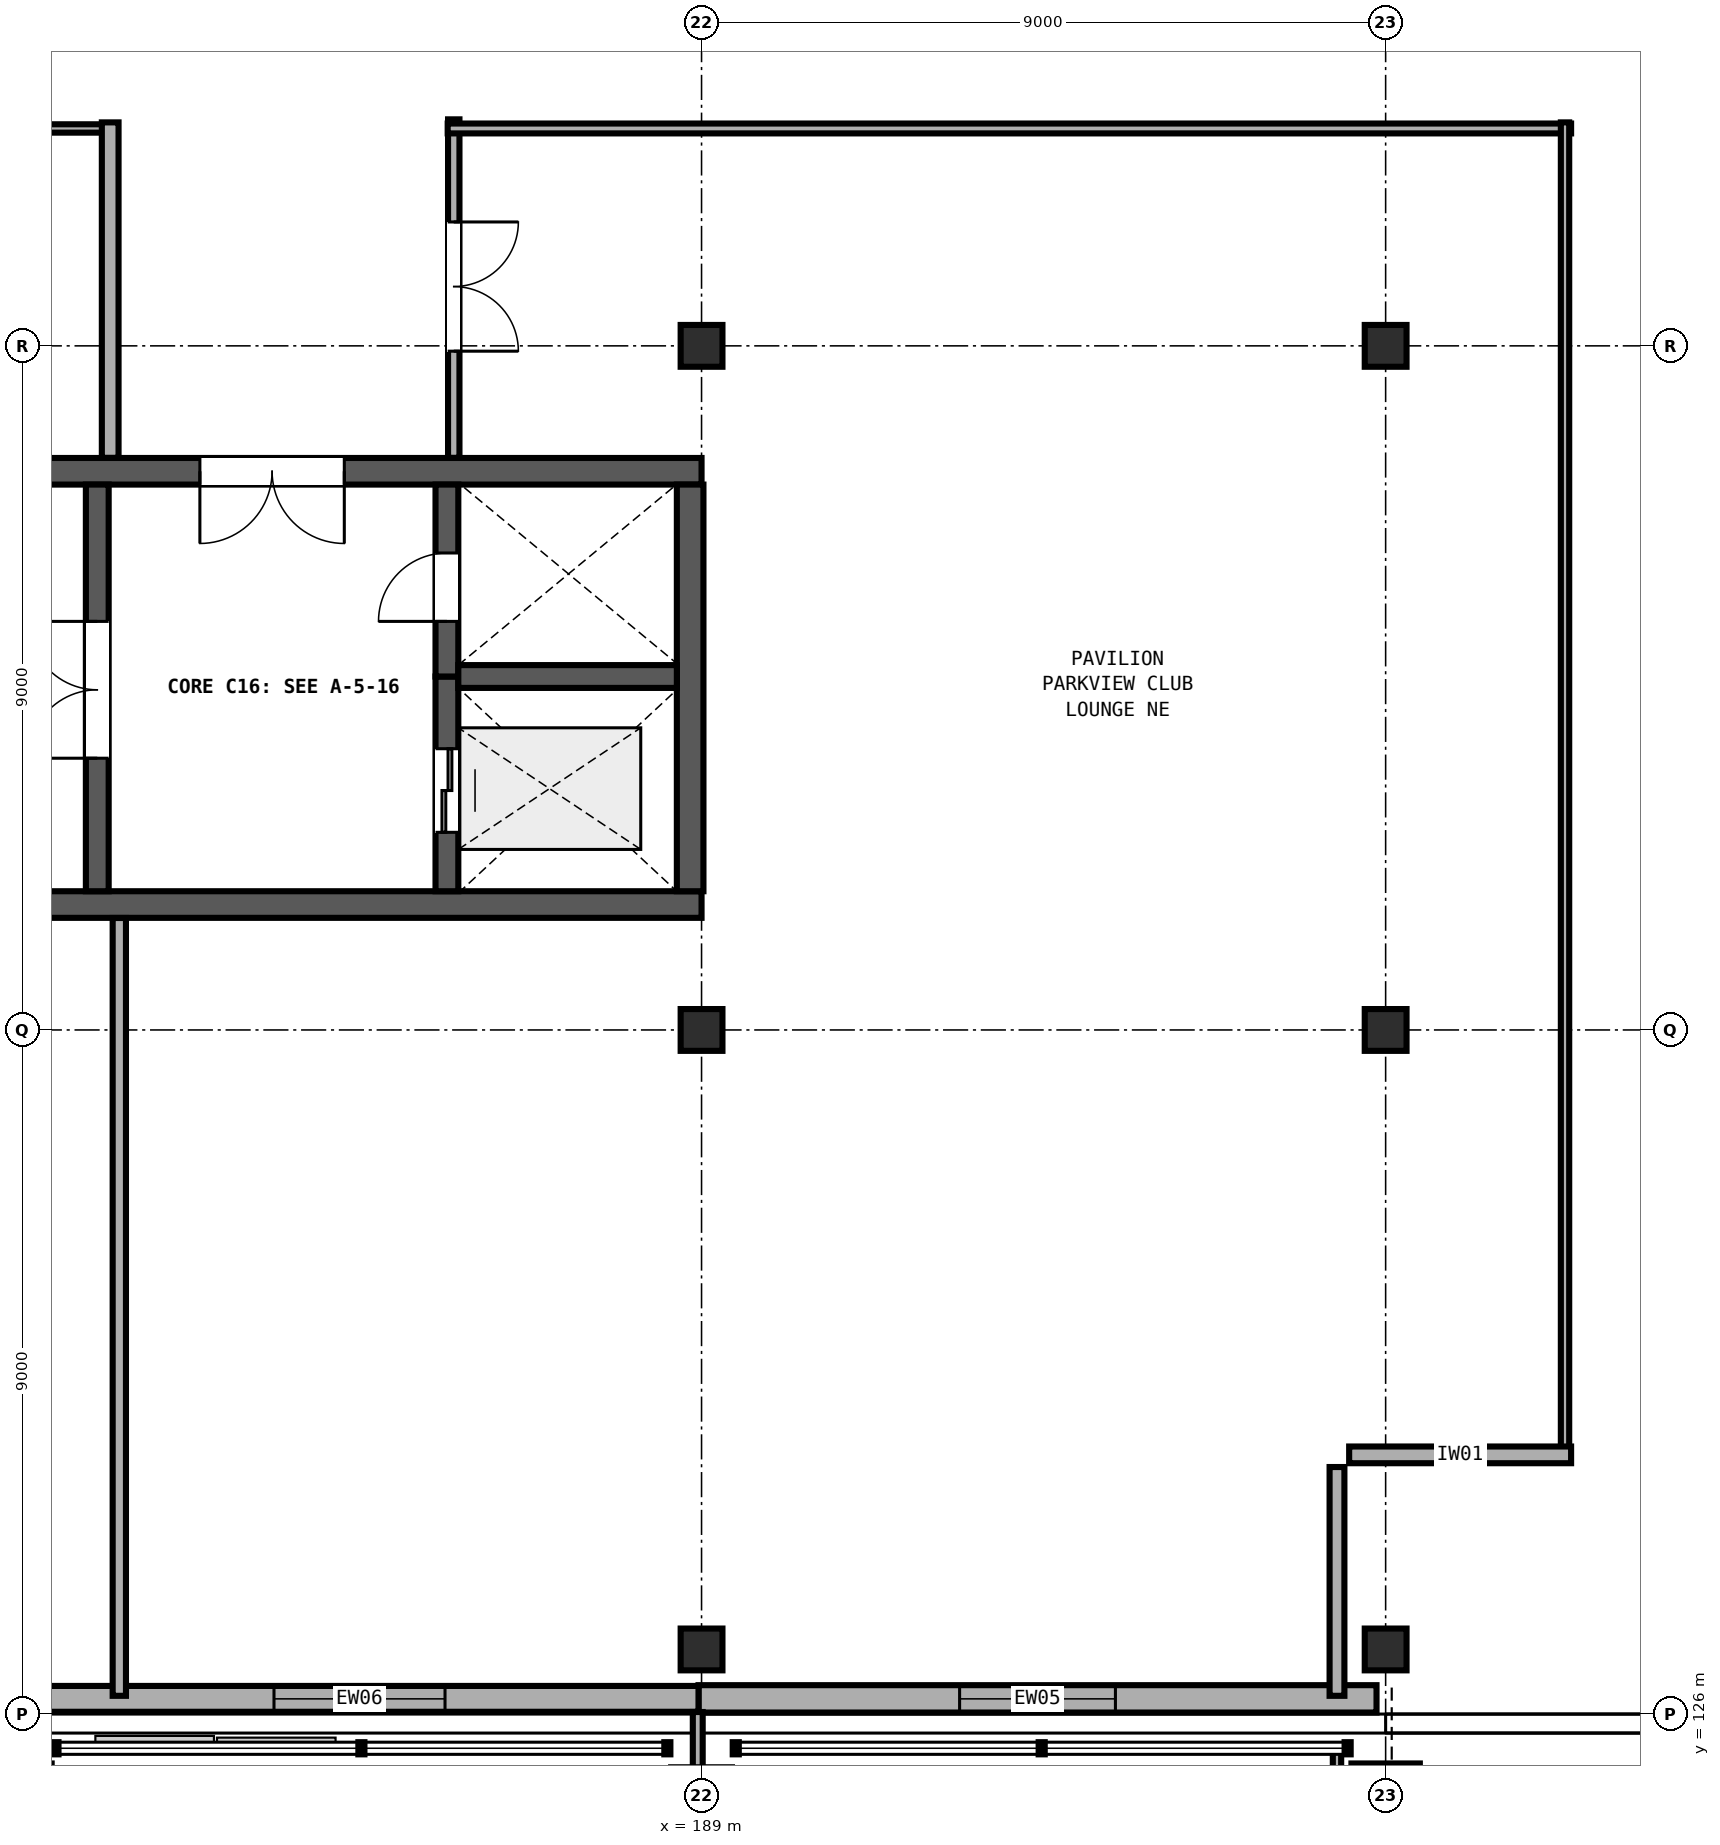
"""IFC4 building model, lengths in metres.
Left out: names, types, materials, properties, quantities, classifications, styles, units other than length and angle.
Written with IfcOpenShell. Run it as: python <this file> out.ifc"""

import sys

from ifc_helpers import new_model, si_unit, direction, frame, frame_2d, origin, origin_2d, place, context, subcontext, project, spatial, rectangle, extrude, element, fill, save


model = new_model("IFC4")
c1 = context("Model", 3, precision=1e-05, world=origin(), true_north=direction((0.0, 1.0)))
c2 = subcontext(c1, "Body", "Model", "MODEL_VIEW")
j1 = project(units=[si_unit("LENGTHUNIT", "METRE"), si_unit("PLANEANGLEUNIT", "RADIAN")], contexts=[c1])
p1 = place(None, origin())
s1 = spatial("IfcSite", under=j1, at=p1, CompositionType="ELEMENT")
p2 = place(p1, origin())
s2 = spatial("IfcBuilding", under=s1, at=p2, CompositionType="ELEMENT")
p3 = place(p2, frame((0.0, 0.0, 9.6)))
s3 = spatial("IfcBuildingStorey", under=s2, at=p3, CompositionType="ELEMENT", Elevation=9.6)
p4 = place(p3, frame((198.0, 124.9, 0.0), z_axis=(0.0, 0.0, 1.0), x_axis=(1.0, 0.0, 0.0)))
e1 = element("IfcColumn", 1, at=p4, inside=s3, PredefinedType="COLUMN", context=c2, shape_type="SweptSolid", body=[
    extrude(rectangle(XDim=0.9, YDim=0.9, at=origin_2d()), origin(), (0.0, 0.0, 1.0), 4.8),
])
for number, where, z_axis, x_axis in (
    (2, (189.0, 126.85, 0.0), (0.0, 0.0, 1.0), (1.0, 0.0, 0.0)),
    (3, (189.0, 135.0, 0.0), (0.0, 0.0, 1.0), (1.0, 0.0, 0.0)),
    (4, (189.0, 144.0, 0.0), (0.0, 0.0, 1.0), (1.0, 0.0, 0.0)),
    (5, (198.0, 126.85, 0.0), (0.0, 0.0, 1.0), (1.0, 0.0, 0.0)),
    (6, (198.0, 135.0, 0.0), (0.0, 0.0, 1.0), (1.0, 0.0, 0.0)),
    (7, (198.0, 144.0, 0.0), (0.0, 0.0, 1.0), (1.0, 0.0, 0.0)),
):
    element("IfcColumn", number, at=place(p3, frame(where, z_axis=z_axis, x_axis=x_axis)), inside=s3, PredefinedType="COLUMN", context=c2, shape_type="SweptSolid", body=[
        extrude(rectangle(XDim=0.55, YDim=0.55, at=origin_2d()), origin(), (0.0, 0.0, 1.0), 4.8),
    ])
p5 = place(p3, frame((171.0, 136.65, 0.0), z_axis=(0.0, 0.0, 1.0), x_axis=(1.0, 0.0, 0.0)))
e8 = element("IfcWall", 8, at=p5, inside=s3, PredefinedType="SHEAR", context=c2, shape_type="SweptSolid", body=[
    extrude(rectangle(XDim=18.0, YDim=0.35, at=frame_2d((9.0, 0.0))), origin(), (0.0, 0.0, 1.0), 4.555),
])
p6 = place(p3, frame((189.0, 142.35, 0.0), z_axis=(0.0, 0.0, 1.0), x_axis=(-1.0, 0.0, 0.0)))
e9 = element("IfcWall", 9, at=p6, inside=s3, PredefinedType="SHEAR", context=c2, shape_type="SweptSolid", body=[
    extrude(rectangle(XDim=18.0, YDim=0.35, at=frame_2d((9.0, 0.0))), origin(), (0.0, 0.0, 1.0), 4.555),
])
p7 = place(p6, frame((4.7, 0.0, 0.0)))
e10 = element("IfcOpeningElement", 10, at=p7, cuts=e9, PredefinedType="OPENING", context=c2, shape_type="SweptSolid", body=[
    extrude(rectangle(XDim=1.9, YDim=2.25, at=frame_2d((0.95, 1.125))), frame((0.0, 0.185, 0.0), z_axis=(0.0, -1.0, 0.0), x_axis=(1.0, 0.0, 0.0)), (0.0, 0.0, 1.0), 0.37),
])
p8 = place(p3, frame((188.85, 136.825, 0.0), z_axis=(0.0, 0.0, 1.0), x_axis=(0.0, 1.0, 0.0)))
e11 = element("IfcWall", 11, at=p8, inside=s3, PredefinedType="SHEAR", context=c2, shape_type="SweptSolid", body=[
    extrude(rectangle(XDim=5.35, YDim=0.35, at=frame_2d((2.675, 0.0))), origin(), (0.0, 0.0, 1.0), 4.555),
])
p9 = place(p3, frame((181.05, 136.825, 0.0), z_axis=(0.0, 0.0, 1.0), x_axis=(0.0, 1.0, 0.0)))
e12 = element("IfcWall", 12, at=p9, inside=s3, PredefinedType="SHEAR", context=c2, shape_type="SweptSolid", body=[
    extrude(rectangle(XDim=5.35, YDim=0.3, at=frame_2d((2.675, 0.0))), origin(), (0.0, 0.0, 1.0), 4.555),
])
p10 = place(p9, frame((1.75, 0.0, 0.0)))
e13 = element("IfcOpeningElement", 13, at=p10, cuts=e12, PredefinedType="OPENING", context=c2, shape_type="SweptSolid", body=[
    extrude(rectangle(XDim=1.8, YDim=2.25, at=frame_2d((0.9, 1.125))), frame((0.0, 0.16, 0.0), z_axis=(0.0, -1.0, 0.0), x_axis=(1.0, 0.0, 0.0)), (0.0, 0.0, 1.0), 0.32),
])
p11 = place(p3, frame((185.65, 136.825, 0.0), z_axis=(0.0, 0.0, 1.0), x_axis=(0.0, 1.0, 0.0)))
e14 = element("IfcWall", 14, at=p11, inside=s3, PredefinedType="SHEAR", context=c2, shape_type="SweptSolid", body=[
    extrude(rectangle(XDim=2.825, YDim=0.3, at=frame_2d((1.413, 0.0))), origin(), (0.0, 0.0, 1.0), 4.555),
])
p12 = place(p11, frame((0.775, 0.0, 0.0)))
e15 = element("IfcOpeningElement", 15, at=p12, cuts=e14, PredefinedType="OPENING", context=c2, shape_type="SweptSolid", body=[
    extrude(rectangle(XDim=1.1, YDim=2.1, at=frame_2d((0.55, 1.05))), frame((0.0, 0.16, 0.0), z_axis=(0.0, -1.0, 0.0), x_axis=(1.0, 0.0, 0.0)), (0.0, 0.0, 1.0), 0.32),
])
p13 = place(p3, frame((185.65, 139.65, 0.0), z_axis=(0.0, 0.0, 1.0), x_axis=(0.0, 1.0, 0.0)))
e16 = element("IfcWall", 16, at=p13, inside=s3, PredefinedType="SHEAR", context=c2, shape_type="SweptSolid", body=[
    extrude(rectangle(XDim=2.525, YDim=0.3, at=frame_2d((1.263, 0.0))), origin(), (0.0, 0.0, 1.0), 4.555),
])
p14 = place(p13, frame((0.725, 0.0, 0.0)))
e17 = element("IfcOpeningElement", 17, at=p14, cuts=e16, PredefinedType="OPENING", context=c2, shape_type="SweptSolid", body=[
    extrude(rectangle(XDim=0.9, YDim=2.1, at=frame_2d((0.45, 1.05))), frame((0.0, 0.16, 0.0), z_axis=(0.0, -1.0, 0.0), x_axis=(1.0, 0.0, 0.0)), (0.0, 0.0, 1.0), 0.32),
])
p15 = place(p3, frame((185.8, 139.65, 0.0), z_axis=(0.0, 0.0, 1.0), x_axis=(1.0, 0.0, 0.0)))
e18 = element("IfcWall", 18, at=p15, inside=s3, PredefinedType="SHEAR", context=c2, shape_type="SweptSolid", body=[
    extrude(rectangle(XDim=2.875, YDim=0.3, at=frame_2d((1.438, 0.0))), origin(), (0.0, 0.0, 1.0), 4.555),
])
p16 = place(p3, frame((197.88, 126.2, 0.0), z_axis=(0.0, 0.0, 1.0), x_axis=(-1.0, 0.0, 0.0)))
e19 = element("IfcWall", 19, at=p16, inside=s3, PredefinedType="SOLIDWALL", context=c2, shape_type="SweptSolid", body=[
    extrude(rectangle(XDim=8.92, YDim=0.36, at=frame_2d((4.46, 0.0))), origin(), (0.0, 0.0, 1.0), 3.58),
])
p17 = place(p16, frame((3.435, 0.0, 0.9)))
e20 = element("IfcOpeningElement", 20, at=p17, cuts=e19, PredefinedType="OPENING", context=c2, shape_type="SweptSolid", body=[
    extrude(rectangle(XDim=2.05, YDim=2.0, at=frame_2d((1.025, 1.0))), frame((0.0, 0.19, 0.0), z_axis=(0.0, -1.0, 0.0), x_axis=(1.0, 0.0, 0.0)), (0.0, 0.0, 1.0), 0.38),
])
p18 = place(p3, frame((188.96, 126.2, 0.0), z_axis=(0.0, 0.0, 1.0), x_axis=(-1.0, 0.0, 0.0)))
e21 = element("IfcWall", 21, at=p18, inside=s3, PredefinedType="SOLIDWALL", context=c2, shape_type="SweptSolid", body=[
    extrude(rectangle(XDim=8.92, YDim=0.34, at=frame_2d((4.46, 0.0))), origin(), (0.0, 0.0, 1.0), 3.58),
])
p19 = place(p18, frame((3.335, 0.0, 0.9)))
e22 = element("IfcOpeningElement", 22, at=p19, cuts=e21, PredefinedType="OPENING", context=c2, shape_type="SweptSolid", body=[
    extrude(rectangle(XDim=2.25, YDim=2.05, at=frame_2d((1.125, 1.025))), frame((0.0, 0.18, 0.0), z_axis=(0.0, -1.0, 0.0), x_axis=(1.0, 0.0, 0.0)), (0.0, 0.0, 1.0), 0.36),
])
p20 = place(p3, frame((188.95, 126.027, 0.0), z_axis=(0.0, 0.0, 1.0), x_axis=(0.0, -1.0, 0.0)))
e23 = element("IfcWall", 23, at=p20, inside=s3, PredefinedType="PARTITIONING", context=c2, shape_type="SweptSolid", body=[
    extrude(rectangle(XDim=17.2, YDim=0.13, at=frame_2d((8.6, 0.0))), origin(), (0.0, 0.0, 1.0), 3.56),
])
p21 = place(p3, frame((197.36, 125.517, 0.0), z_axis=(0.0, 0.0, 1.0), x_axis=(0.0, -1.0, 0.0)))
e24 = element("IfcWall", 24, at=p21, inside=s3, PredefinedType="PARTITIONING", context=c2, shape_type="SweptSolid", body=[
    extrude(rectangle(XDim=3.017, YDim=0.11, at=frame_2d((1.509, 0.0))), origin(), (0.0, 0.0, 1.0), 3.56),
])
p22 = place(p3, frame((185.74, 146.98, 0.0), z_axis=(0.0, 0.0, 1.0), x_axis=(0.0, -1.0, 0.0)))
e25 = element("IfcWall", 25, at=p22, inside=s3, PredefinedType="PARTITIONING", context=c2, shape_type="SweptSolid", body=[
    extrude(rectangle(XDim=4.453, YDim=0.15, at=frame_2d((2.227, 0.0))), origin(), (0.0, 0.0, 1.0), 3.56),
])
p23 = place(p22, frame((1.35, 0.0, 0.0)))
e26 = element("IfcOpeningElement", 26, at=p23, cuts=e25, PredefinedType="OPENING", context=c2, shape_type="SweptSolid", body=[
    extrude(rectangle(XDim=1.7, YDim=2.2, at=frame_2d((0.85, 1.1))), frame((0.0, 0.085, 0.0), z_axis=(0.0, -1.0, 0.0), x_axis=(1.0, 0.0, 0.0)), (0.0, 0.0, 1.0), 0.17),
])
p24 = place(p3, frame((185.66, 146.86, 0.0), z_axis=(0.0, 0.0, 1.0), x_axis=(1.0, 0.0, 0.0)))
e27 = element("IfcWall", 27, at=p24, inside=s3, PredefinedType="PARTITIONING", context=c2, shape_type="SweptSolid", body=[
    extrude(rectangle(XDim=14.78, YDim=0.13, at=frame_2d((7.39, 0.0))), origin(), (0.0, 0.0, 1.0), 3.56),
])
p25 = place(p3, frame((200.36, 146.94, 0.0), z_axis=(0.0, 0.0, 1.0), x_axis=(0.0, -1.0, 0.0)))
e28 = element("IfcWall", 28, at=p25, inside=s3, PredefinedType="PARTITIONING", context=c2, shape_type="SweptSolid", body=[
    extrude(rectangle(XDim=17.61, YDim=0.11, at=frame_2d((8.805, 0.0))), origin(), (0.0, 0.0, 1.0), 3.56),
])
p26 = place(p3, frame((200.44, 129.41, 0.0), z_axis=(0.0, 0.0, 1.0), x_axis=(-1.0, 0.0, 0.0)))
e29 = element("IfcWall", 29, at=p26, inside=s3, PredefinedType="PARTITIONING", context=c2, shape_type="SweptSolid", body=[
    extrude(rectangle(XDim=2.92, YDim=0.22, at=frame_2d((1.46, 0.0))), origin(), (0.0, 0.0, 1.0), 3.56),
])
p27 = place(p3, frame((197.36, 129.25, 0.0), z_axis=(0.0, 0.0, 1.0), x_axis=(0.0, -1.0, 0.0)))
e30 = element("IfcWall", 30, at=p27, inside=s3, PredefinedType="PARTITIONING", context=c2, shape_type="SweptSolid", body=[
    extrude(rectangle(XDim=3.01, YDim=0.195, at=frame_2d((1.505, 0.0))), origin(), (0.0, 0.0, 1.0), 3.56),
])
p28 = place(p3, frame((181.34, 126.24, 0.0), z_axis=(0.0, 0.0, 1.0), x_axis=(0.0, 1.0, 0.0)))
e31 = element("IfcWall", 31, at=p28, inside=s3, PredefinedType="PARTITIONING", context=c2, shape_type="SweptSolid", body=[
    extrude(rectangle(XDim=10.233, YDim=0.175, at=frame_2d((5.116, 0.0))), origin(), (0.0, 0.0, 1.0), 3.56),
])
p29 = place(p3, frame((165.33, 146.86, 0.0), z_axis=(0.0, 0.0, 1.0), x_axis=(1.0, 0.0, 0.0)))
e32 = element("IfcWall", 32, at=p29, inside=s3, PredefinedType="PARTITIONING", context=c2, shape_type="SweptSolid", body=[
    extrude(rectangle(XDim=15.97, YDim=0.11, at=frame_2d((7.985, 0.0))), origin(), (0.0, 0.0, 1.0), 3.56),
])
p30 = place(p3, frame((181.22, 146.94, 0.0), z_axis=(0.0, 0.0, 1.0), x_axis=(0.0, -1.0, 0.0)))
e33 = element("IfcWall", 33, at=p30, inside=s3, PredefinedType="PARTITIONING", context=c2, shape_type="SweptSolid", body=[
    extrude(rectangle(XDim=4.413, YDim=0.22, at=frame_2d((2.207, 0.0))), origin(), (0.0, 0.0, 1.0), 3.56),
])
p31 = place(p17, origin())
e34 = element("IfcWindow", 34, at=p31, inside=s3, PartitioningType="DOUBLE_PANEL_VERTICAL", PredefinedType="WINDOW", context=c2, shape_type="SweptSolid", body=[
    extrude(rectangle(XDim=2.05, YDim=2.0, at=frame_2d((1.025, 1.0))), frame((0.0, 0.03, 0.0), z_axis=(0.0, -1.0, 0.0), x_axis=(1.0, 0.0, 0.0)), (0.0, 0.0, 1.0), 0.06),
])
fill(e20, e34)
p32 = place(p19, origin())
e35 = element("IfcWindow", 35, at=p32, inside=s3, PartitioningType="DOUBLE_PANEL_VERTICAL", PredefinedType="WINDOW", context=c2, shape_type="SweptSolid", body=[
    extrude(rectangle(XDim=2.25, YDim=2.05, at=frame_2d((1.125, 1.025))), frame((0.0, 0.03, 0.0), z_axis=(0.0, -1.0, 0.0), x_axis=(1.0, 0.0, 0.0)), (0.0, 0.0, 1.0), 0.06),
])
fill(e22, e35)
p33 = place(p10, origin())
e36 = element("IfcDoor", 36, at=p33, inside=s3, OperationType="DOUBLE_DOOR_SINGLE_SWING", PredefinedType="DOOR", context=c2, shape_type="SweptSolid", body=[
    extrude(rectangle(XDim=1.8, YDim=2.25, at=frame_2d((0.9, 1.125))), frame((0.0, 0.025, 0.0), z_axis=(0.0, -1.0, 0.0), x_axis=(1.0, 0.0, 0.0)), (0.0, 0.0, 1.0), 0.05),
])
fill(e13, e36)
p34 = place(p14, origin())
e37 = element("IfcDoor", 37, at=p34, inside=s3, OperationType="SINGLE_SWING_LEFT", PredefinedType="DOOR", context=c2, shape_type="SweptSolid", body=[
    extrude(rectangle(XDim=0.9, YDim=2.1, at=frame_2d((0.45, 1.05))), frame((0.0, 0.025, 0.0), z_axis=(0.0, -1.0, 0.0), x_axis=(1.0, 0.0, 0.0)), (0.0, 0.0, 1.0), 0.05),
])
fill(e17, e37)
p35 = place(p12, origin())
e38 = element("IfcDoor", 38, at=p35, inside=s3, OperationType="DOUBLE_DOOR_SLIDING", PredefinedType="DOOR", context=c2, shape_type="SweptSolid", body=[
    extrude(rectangle(XDim=1.1, YDim=2.1, at=frame_2d((0.55, 1.05))), frame((0.0, 0.025, 0.0), z_axis=(0.0, -1.0, 0.0), x_axis=(1.0, 0.0, 0.0)), (0.0, 0.0, 1.0), 0.05),
])
fill(e15, e38)
p36 = place(p7, origin())
e39 = element("IfcDoor", 39, at=p36, inside=s3, OperationType="DOUBLE_DOOR_SINGLE_SWING", PredefinedType="DOOR", context=c2, shape_type="SweptSolid", body=[
    extrude(rectangle(XDim=1.9, YDim=2.25, at=frame_2d((0.95, 1.125))), frame((0.0, 0.025, 0.0), z_axis=(0.0, -1.0, 0.0), x_axis=(1.0, 0.0, 0.0)), (0.0, 0.0, 1.0), 0.05),
])
fill(e10, e39)
p37 = place(p23, origin())
e40 = element("IfcDoor", 40, at=p37, inside=s3, OperationType="DOUBLE_DOOR_SINGLE_SWING", PredefinedType="DOOR", context=c2, shape_type="SweptSolid", body=[
    extrude(rectangle(XDim=1.7, YDim=2.2, at=frame_2d((0.85, 1.1))), frame((0.0, 0.025, 0.0), z_axis=(0.0, -1.0, 0.0), x_axis=(1.0, 0.0, 0.0)), (0.0, 0.0, 1.0), 0.05),
])
fill(e26, e40)
save(model, sys.argv[1])
